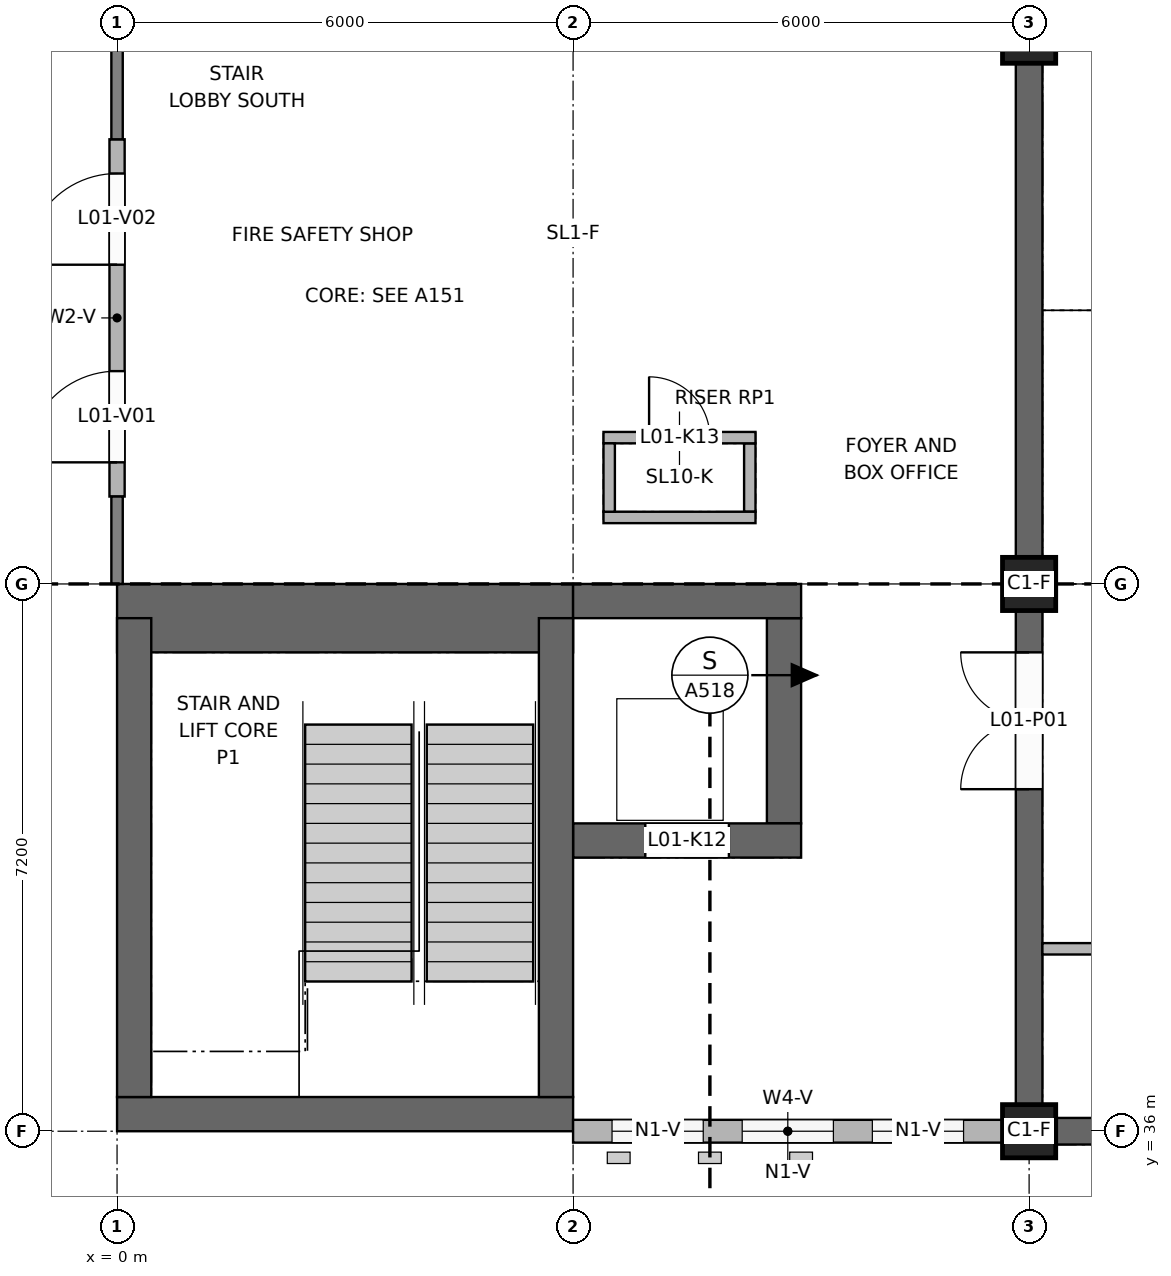
"""IFC4 building model, lengths in metres.
Left out: names, types, materials, properties, quantities, classifications, styles, units other than length and angle.
Written with IfcOpenShell. Run it as: python <this file> out.ifc"""

import sys

from ifc_helpers import new_model, si_unit, direction, frame, frame_2d, origin, origin_2d, place, context, subcontext, project, spatial, rectangle, extrude, element, fill, save


model = new_model("IFC4")
c1 = context("Model", 3, precision=1e-05, world=origin(), true_north=direction((0.0, 1.0)))
c2 = subcontext(c1, "Body", "Model", "MODEL_VIEW")
j1 = project(units=[si_unit("LENGTHUNIT", "METRE"), si_unit("PLANEANGLEUNIT", "RADIAN")], contexts=[c1])
p1 = place(None, origin())
s1 = spatial("IfcSite", under=j1, at=p1, CompositionType="ELEMENT")
p2 = place(p1, origin())
s2 = spatial("IfcBuilding", under=s1, at=p2, CompositionType="ELEMENT")
p3 = place(p2, frame((0.0, 0.0, 4.2)))
s3 = spatial("IfcBuildingStorey", under=s2, at=p3, CompositionType="ELEMENT", Elevation=4.2)
p4 = place(p3, frame((0.0, 36.225, 0.0), z_axis=(0.0, 0.0, 1.0), x_axis=(1.0, 0.0, 0.0)))
e1 = element("IfcWall", 1, at=p4, inside=s3, PredefinedType="SHEAR", context=c2, shape_type="SweptSolid", body=[
    extrude(rectangle(XDim=6.0, YDim=0.45, at=frame_2d((3.0, 0.0))), origin(), (0.0, 0.0, 1.0), 3.95),
])
p5 = place(p3, frame((0.0, 42.975, 0.0), z_axis=(0.0, 0.0, 1.0), x_axis=(1.0, 0.0, 0.0)))
e2 = element("IfcWall", 2, at=p5, inside=s3, PredefinedType="SHEAR", context=c2, shape_type="SweptSolid", body=[
    extrude(rectangle(XDim=6.0, YDim=0.45, at=frame_2d((3.0, 0.0))), origin(), (0.0, 0.0, 1.0), 3.95),
])
p6 = place(p5, frame((2.4, 0.0, 0.0)))
e3 = element("IfcOpeningElement", 3, at=p6, cuts=e2, PredefinedType="OPENING", context=c2, shape_type="SweptSolid", body=[
    extrude(rectangle(XDim=1.2, YDim=2.1, at=frame_2d((0.6, 1.05))), frame((0.0, 0.235, 0.0), z_axis=(0.0, -1.0, 0.0), x_axis=(1.0, 0.0, 0.0)), (0.0, 0.0, 1.0), 0.47),
])
p7 = place(p3, frame((0.225, 36.45, 0.0), z_axis=(0.0, 0.0, 1.0), x_axis=(0.0, 1.0, 0.0)))
e4 = element("IfcWall", 4, at=p7, inside=s3, PredefinedType="SHEAR", context=c2, shape_type="SweptSolid", body=[
    extrude(rectangle(XDim=6.3, YDim=0.45, at=frame_2d((3.15, 0.0))), origin(), (0.0, 0.0, 1.0), 3.95),
])
p8 = place(p7, frame((1.45, 0.0, 0.0)))
e5 = element("IfcOpeningElement", 5, at=p8, cuts=e4, PredefinedType="OPENING", context=c2, shape_type="SweptSolid", body=[
    extrude(rectangle(XDim=1.4, YDim=2.1, at=frame_2d((0.7, 1.05))), frame((0.0, 0.235, 0.0), z_axis=(0.0, -1.0, 0.0), x_axis=(1.0, 0.0, 0.0)), (0.0, 0.0, 1.0), 0.47),
])
p9 = place(p3, frame((5.775, 36.45, 0.0), z_axis=(0.0, 0.0, 1.0), x_axis=(0.0, 1.0, 0.0)))
e6 = element("IfcWall", 6, at=p9, inside=s3, PredefinedType="SHEAR", context=c2, shape_type="SweptSolid", body=[
    extrude(rectangle(XDim=6.3, YDim=0.45, at=frame_2d((3.15, 0.0))), origin(), (0.0, 0.0, 1.0), 3.95),
])
p10 = place(p3, frame((6.0, 39.825, 0.0), z_axis=(0.0, 0.0, 1.0), x_axis=(1.0, 0.0, 0.0)))
e7 = element("IfcWall", 7, at=p10, inside=s3, PredefinedType="SHEAR", context=c2, shape_type="SweptSolid", body=[
    extrude(rectangle(XDim=3.0, YDim=0.45, at=frame_2d((1.5, 0.0))), origin(), (0.0, 0.0, 1.0), 4.2),
])
p11 = place(p10, frame((0.95, 0.0, 0.0)))
e8 = element("IfcOpeningElement", 8, at=p11, cuts=e7, PredefinedType="OPENING", context=c2, shape_type="SweptSolid", body=[
    extrude(rectangle(XDim=1.1, YDim=2.1, at=frame_2d((0.55, 1.05))), frame((0.0, 0.235, 0.0), z_axis=(0.0, -1.0, 0.0), x_axis=(1.0, 0.0, 0.0)), (0.0, 0.0, 1.0), 0.47),
])
p12 = place(p3, frame((6.0, 42.975, 0.0), z_axis=(0.0, 0.0, 1.0), x_axis=(1.0, 0.0, 0.0)))
e9 = element("IfcWall", 9, at=p12, inside=s3, PredefinedType="SHEAR", context=c2, shape_type="SweptSolid", body=[
    extrude(rectangle(XDim=3.0, YDim=0.45, at=frame_2d((1.5, 0.0))), origin(), (0.0, 0.0, 1.0), 4.2),
])
p13 = place(p3, frame((8.775, 40.05, 0.0), z_axis=(0.0, 0.0, 1.0), x_axis=(0.0, 1.0, 0.0)))
e10 = element("IfcWall", 10, at=p13, inside=s3, PredefinedType="SHEAR", context=c2, shape_type="SweptSolid", body=[
    extrude(rectangle(XDim=2.7, YDim=0.45, at=frame_2d((1.35, 0.0))), origin(), (0.0, 0.0, 1.0), 4.2),
])
p14 = place(p3, frame((0.0, 36.225, -0.2), z_axis=(0.0, 0.0, 1.0), x_axis=(1.0, 0.0, 0.0)))
e11 = element("IfcWall", 11, at=p14, inside=s3, PredefinedType="SOLIDWALL", context=c2, shape_type="SweptSolid", body=[
    extrude(rectangle(XDim=6.0, YDim=0.45, at=frame_2d((3.0, 0.0))), origin(), (0.0, 0.0, 1.0), 0.2),
])
p15 = place(p3, frame((0.0, 42.75, -0.2), z_axis=(0.0, 0.0, 1.0), x_axis=(1.0, 0.0, 0.0)))
e12 = element("IfcWall", 12, at=p15, inside=s3, PredefinedType="SOLIDWALL", context=c2, shape_type="SweptSolid", body=[
    extrude(rectangle(XDim=6.0, YDim=0.9, at=frame_2d((3.0, 0.0))), origin(), (0.0, 0.0, 1.0), 0.2),
])
p16 = place(p3, frame((0.225, 36.45, -0.2), z_axis=(0.0, 0.0, 1.0), x_axis=(0.0, 1.0, 0.0)))
e13 = element("IfcWall", 13, at=p16, inside=s3, PredefinedType="SOLIDWALL", context=c2, shape_type="SweptSolid", body=[
    extrude(rectangle(XDim=6.3, YDim=0.45, at=frame_2d((3.15, 0.0))), origin(), (0.0, 0.0, 1.0), 0.2),
])
p17 = place(p3, frame((6.4, 44.075, 0.0), z_axis=(0.0, 0.0, 1.0), x_axis=(1.0, 0.0, 0.0)))
e14 = element("IfcWall", 14, at=p17, inside=s3, PredefinedType="SOLIDWALL", context=c2, shape_type="SweptSolid", body=[
    extrude(rectangle(XDim=2.0, YDim=0.15, at=frame_2d((1.0, 0.0))), origin(), (0.0, 0.0, 1.0), 4.2),
])
p18 = place(p3, frame((6.4, 45.125, 0.0), z_axis=(0.0, 0.0, 1.0), x_axis=(1.0, 0.0, 0.0)))
e15 = element("IfcWall", 15, at=p18, inside=s3, PredefinedType="SOLIDWALL", context=c2, shape_type="SweptSolid", body=[
    extrude(rectangle(XDim=2.0, YDim=0.15, at=frame_2d((1.0, 0.0))), origin(), (0.0, 0.0, 1.0), 4.2),
])
p19 = place(p18, frame((0.6, 0.0, 0.0)))
e16 = element("IfcOpeningElement", 16, at=p19, cuts=e15, PredefinedType="OPENING", context=c2, shape_type="SweptSolid", body=[
    extrude(rectangle(XDim=0.8, YDim=2.1, at=frame_2d((0.4, 1.05))), frame((0.0, 0.085, 0.0), z_axis=(0.0, -1.0, 0.0), x_axis=(1.0, 0.0, 0.0)), (0.0, 0.0, 1.0), 0.17),
])
for number, where, z_axis, x_axis in (
    (17, (6.475, 44.15, 0.0), (0.0, 0.0, 1.0), (0.0, 1.0, 0.0)),
    (18, (8.325, 44.15, 0.0), (0.0, 0.0, 1.0), (0.0, 1.0, 0.0)),
):
    element("IfcWall", number, at=place(p3, frame(where, z_axis=z_axis, x_axis=x_axis)), inside=s3, PredefinedType="SOLIDWALL", context=c2, shape_type="SweptSolid", body=[
        extrude(rectangle(XDim=0.9, YDim=0.15, at=frame_2d((0.45, 0.0))), origin(), (0.0, 0.0, 1.0), 4.2),
    ])
for number, where, z_axis, x_axis in (
    (19, (12.0, 36.0, 0.0), (0.0, 0.0, 1.0), (1.0, 0.0, 0.0)),
    (20, (12.0, 43.2, 0.0), (0.0, 0.0, 1.0), (1.0, 0.0, 0.0)),
    (21, (12.0, 50.4, 0.0), (0.0, 0.0, 1.0), (1.0, 0.0, 0.0)),
):
    element("IfcColumn", number, at=place(p3, frame(where, z_axis=z_axis, x_axis=x_axis)), inside=s3, PredefinedType="COLUMN", context=c2, shape_type="SweptSolid", body=[
        extrude(rectangle(XDim=0.7, YDim=0.7, at=origin_2d()), origin(), (0.0, 0.0, 1.0), 3.95),
    ])
p20 = place(p3, frame((12.0, 36.35, 0.0), z_axis=(0.0, 0.0, 1.0), x_axis=(0.0, 1.0, 0.0)))
e22 = element("IfcWall", 22, at=p20, inside=s3, PredefinedType="SHEAR", context=c2, shape_type="SweptSolid", body=[
    extrude(rectangle(XDim=6.5, YDim=0.35, at=frame_2d((3.25, 0.0))), origin(), (0.0, 0.0, 1.0), 3.05),
])
p21 = place(p20, frame((4.15, 0.0, 0.0)))
e23 = element("IfcOpeningElement", 23, at=p21, cuts=e22, PredefinedType="OPENING", context=c2, shape_type="SweptSolid", body=[
    extrude(rectangle(XDim=1.8, YDim=2.1, at=frame_2d((0.9, 1.05))), frame((0.0, 0.185, 0.0), z_axis=(0.0, -1.0, 0.0), x_axis=(1.0, 0.0, 0.0)), (0.0, 0.0, 1.0), 0.37),
])
p22 = place(p3, frame((12.0, 43.55, 0.0), z_axis=(0.0, 0.0, 1.0), x_axis=(0.0, 1.0, 0.0)))
e24 = element("IfcWall", 24, at=p22, inside=s3, PredefinedType="SHEAR", context=c2, shape_type="SweptSolid", body=[
    extrude(rectangle(XDim=6.5, YDim=0.35, at=frame_2d((3.25, 0.0))), origin(), (0.0, 0.0, 1.0), 3.05),
])
p23 = place(p3, frame((12.35, 36.0, 0.0), z_axis=(0.0, 0.0, 1.0), x_axis=(1.0, 0.0, 0.0)))
e25 = element("IfcWall", 25, at=p23, inside=s3, PredefinedType="SHEAR", context=c2, shape_type="SweptSolid", body=[
    extrude(rectangle(XDim=17.475, YDim=0.35, at=frame_2d((8.737, 0.0))), origin(), (0.0, 0.0, 1.0), 4.2),
])
p24 = place(p23, frame((0.85, 0.0, 1.2)))
e26 = element("IfcOpeningElement", 26, at=p24, cuts=e25, PredefinedType="OPENING", context=c2, shape_type="SweptSolid", body=[
    extrude(rectangle(XDim=0.6, YDim=2.4, at=frame_2d((0.3, 1.2))), frame((0.0, 0.185, 0.0), z_axis=(0.0, -1.0, 0.0), x_axis=(1.0, 0.0, 0.0)), (0.0, 0.0, 1.0), 0.37),
])
p25 = place(p23, frame((3.85, 0.0, 1.2)))
e27 = element("IfcOpeningElement", 27, at=p25, cuts=e25, PredefinedType="OPENING", context=c2, shape_type="SweptSolid", body=[
    extrude(rectangle(XDim=0.6, YDim=2.4, at=frame_2d((0.3, 1.2))), frame((0.0, 0.185, 0.0), z_axis=(0.0, -1.0, 0.0), x_axis=(1.0, 0.0, 0.0)), (0.0, 0.0, 1.0), 0.37),
])
p26 = place(p23, frame((6.85, 0.0, 1.2)))
e28 = element("IfcOpeningElement", 28, at=p26, cuts=e25, PredefinedType="OPENING", context=c2, shape_type="SweptSolid", body=[
    extrude(rectangle(XDim=0.6, YDim=2.4, at=frame_2d((0.3, 1.2))), frame((0.0, 0.185, 0.0), z_axis=(0.0, -1.0, 0.0), x_axis=(1.0, 0.0, 0.0)), (0.0, 0.0, 1.0), 0.37),
])
p27 = place(p23, frame((9.85, 0.0, 1.2)))
e29 = element("IfcOpeningElement", 29, at=p27, cuts=e25, PredefinedType="OPENING", context=c2, shape_type="SweptSolid", body=[
    extrude(rectangle(XDim=0.6, YDim=2.4, at=frame_2d((0.3, 1.2))), frame((0.0, 0.185, 0.0), z_axis=(0.0, -1.0, 0.0), x_axis=(1.0, 0.0, 0.0)), (0.0, 0.0, 1.0), 0.37),
])
p28 = place(p23, frame((12.85, 0.0, 1.2)))
e30 = element("IfcOpeningElement", 30, at=p28, cuts=e25, PredefinedType="OPENING", context=c2, shape_type="SweptSolid", body=[
    extrude(rectangle(XDim=0.6, YDim=2.4, at=frame_2d((0.3, 1.2))), frame((0.0, 0.185, 0.0), z_axis=(0.0, -1.0, 0.0), x_axis=(1.0, 0.0, 0.0)), (0.0, 0.0, 1.0), 0.37),
])
p29 = place(p23, frame((15.85, 0.0, 1.2)))
e31 = element("IfcOpeningElement", 31, at=p29, cuts=e25, PredefinedType="OPENING", context=c2, shape_type="SweptSolid", body=[
    extrude(rectangle(XDim=0.6, YDim=2.4, at=frame_2d((0.3, 1.2))), frame((0.0, 0.185, 0.0), z_axis=(0.0, -1.0, 0.0), x_axis=(1.0, 0.0, 0.0)), (0.0, 0.0, 1.0), 0.37),
])
p30 = place(p3, frame((0.0, 44.35, 0.0), z_axis=(0.0, 0.0, 1.0), x_axis=(0.0, 1.0, 0.0)))
e32 = element("IfcWall", 32, at=p30, inside=s3, PredefinedType="SOLIDWALL", context=c2, shape_type="SweptSolid", body=[
    extrude(rectangle(XDim=4.7, YDim=0.2, at=frame_2d((2.35, 0.0))), origin(), (0.0, 0.0, 1.0), 3.05),
])
p31 = place(p30, frame((0.45, 0.0, 0.0)))
e33 = element("IfcOpeningElement", 33, at=p31, cuts=e32, PredefinedType="OPENING", context=c2, shape_type="SweptSolid", body=[
    extrude(rectangle(XDim=1.2, YDim=2.4, at=frame_2d((0.6, 1.2))), frame((0.0, 0.11, 0.0), z_axis=(0.0, -1.0, 0.0), x_axis=(1.0, 0.0, 0.0)), (0.0, 0.0, 1.0), 0.22),
])
p32 = place(p30, frame((3.05, 0.0, 0.0)))
e34 = element("IfcOpeningElement", 34, at=p32, cuts=e32, PredefinedType="OPENING", context=c2, shape_type="SweptSolid", body=[
    extrude(rectangle(XDim=1.2, YDim=2.4, at=frame_2d((0.6, 1.2))), frame((0.0, 0.11, 0.0), z_axis=(0.0, -1.0, 0.0), x_axis=(1.0, 0.0, 0.0)), (0.0, 0.0, 1.0), 0.22),
])
p33 = place(p3, frame((6.0, 36.0, 0.0), z_axis=(0.0, 0.0, 1.0), x_axis=(1.0, 0.0, 0.0)))
e35 = element("IfcWall", 35, at=p33, inside=s3, PredefinedType="SOLIDWALL", context=c2, shape_type="SweptSolid", body=[
    extrude(rectangle(XDim=5.65, YDim=0.3, at=frame_2d((2.825, 0.0))), origin(), (0.0, 0.0, 1.0), 3.15),
])
p34 = place(p33, frame((0.512, 0.0, 0.9)))
e36 = element("IfcOpeningElement", 36, at=p34, cuts=e35, PredefinedType="OPENING", context=c2, shape_type="SweptSolid", body=[
    extrude(rectangle(XDim=1.2, YDim=1.5, at=frame_2d((0.6, 0.75))), frame((0.0, 0.16, 0.0), z_axis=(0.0, -1.0, 0.0), x_axis=(1.0, 0.0, 0.0)), (0.0, 0.0, 1.0), 0.32),
])
p35 = place(p33, frame((2.225, 0.0, 0.9)))
e37 = element("IfcOpeningElement", 37, at=p35, cuts=e35, PredefinedType="OPENING", context=c2, shape_type="SweptSolid", body=[
    extrude(rectangle(XDim=1.2, YDim=1.5, at=frame_2d((0.6, 0.75))), frame((0.0, 0.16, 0.0), z_axis=(0.0, -1.0, 0.0), x_axis=(1.0, 0.0, 0.0)), (0.0, 0.0, 1.0), 0.32),
])
p36 = place(p33, frame((3.938, 0.0, 0.9)))
e38 = element("IfcOpeningElement", 38, at=p36, cuts=e35, PredefinedType="OPENING", context=c2, shape_type="SweptSolid", body=[
    extrude(rectangle(XDim=1.2, YDim=1.5, at=frame_2d((0.6, 0.75))), frame((0.0, 0.16, 0.0), z_axis=(0.0, -1.0, 0.0), x_axis=(1.0, 0.0, 0.0)), (0.0, 0.0, 1.0), 0.32),
])
p37 = place(p3, frame((12.175, 38.4, 0.0), z_axis=(0.0, 0.0, 1.0), x_axis=(1.0, 0.0, 0.0)))
e39 = element("IfcWall", 39, at=p37, inside=s3, PredefinedType="PARTITIONING", context=c2, shape_type="SweptSolid", body=[
    extrude(rectangle(XDim=17.65, YDim=0.15, at=frame_2d((8.825, 0.0))), origin(), (0.0, 0.0, 1.0), 3.05),
])
p38 = place(p37, frame((8.225, 0.0, 0.0)))
e40 = element("IfcOpeningElement", 40, at=p38, cuts=e39, PredefinedType="OPENING", context=c2, shape_type="SweptSolid", body=[
    extrude(rectangle(XDim=1.2, YDim=2.1, at=frame_2d((0.6, 1.05))), frame((0.0, 0.085, 0.0), z_axis=(0.0, -1.0, 0.0), x_axis=(1.0, 0.0, 0.0)), (0.0, 0.0, 1.0), 0.17),
])
p39 = place(p31, origin())
e41 = element("IfcDoor", 41, at=p39, inside=s3, OperationType="SINGLE_SWING_LEFT", PredefinedType="DOOR", context=c2, shape_type="SweptSolid", body=[
    extrude(rectangle(XDim=1.2, YDim=2.4, at=frame_2d((0.6, 1.2))), frame((0.0, 0.025, 0.0), z_axis=(0.0, -1.0, 0.0), x_axis=(1.0, 0.0, 0.0)), (0.0, 0.0, 1.0), 0.05),
])
fill(e33, e41)
p40 = place(p32, origin())
e42 = element("IfcDoor", 42, at=p40, inside=s3, OperationType="SINGLE_SWING_LEFT", PredefinedType="DOOR", context=c2, shape_type="SweptSolid", body=[
    extrude(rectangle(XDim=1.2, YDim=2.4, at=frame_2d((0.6, 1.2))), frame((0.0, 0.025, 0.0), z_axis=(0.0, -1.0, 0.0), x_axis=(1.0, 0.0, 0.0)), (0.0, 0.0, 1.0), 0.05),
])
fill(e34, e42)
p41 = place(p34, origin())
e43 = element("IfcWindow", 43, at=p41, inside=s3, PartitioningType="SINGLE_PANEL", PredefinedType="WINDOW", context=c2, shape_type="SweptSolid", body=[
    extrude(rectangle(XDim=1.2, YDim=1.5, at=frame_2d((0.6, 0.75))), frame((0.0, 0.03, 0.0), z_axis=(0.0, -1.0, 0.0), x_axis=(1.0, 0.0, 0.0)), (0.0, 0.0, 1.0), 0.06),
])
fill(e36, e43)
p42 = place(p35, origin())
e44 = element("IfcWindow", 44, at=p42, inside=s3, PartitioningType="SINGLE_PANEL", PredefinedType="WINDOW", context=c2, shape_type="SweptSolid", body=[
    extrude(rectangle(XDim=1.2, YDim=1.5, at=frame_2d((0.6, 0.75))), frame((0.0, 0.03, 0.0), z_axis=(0.0, -1.0, 0.0), x_axis=(1.0, 0.0, 0.0)), (0.0, 0.0, 1.0), 0.06),
])
fill(e37, e44)
p43 = place(p36, origin())
e45 = element("IfcWindow", 45, at=p43, inside=s3, PartitioningType="SINGLE_PANEL", PredefinedType="WINDOW", context=c2, shape_type="SweptSolid", body=[
    extrude(rectangle(XDim=1.2, YDim=1.5, at=frame_2d((0.6, 0.75))), frame((0.0, 0.03, 0.0), z_axis=(0.0, -1.0, 0.0), x_axis=(1.0, 0.0, 0.0)), (0.0, 0.0, 1.0), 0.06),
])
fill(e38, e45)
p44 = place(p6, frame((1.2, 0.0, 0.0), z_axis=(0.0, 0.0, 1.0), x_axis=(-1.0, 0.0, 0.0)))
e46 = element("IfcDoor", 46, at=p44, inside=s3, OperationType="SINGLE_SWING_RIGHT", PredefinedType="DOOR", context=c2, shape_type="SweptSolid", body=[
    extrude(rectangle(XDim=1.2, YDim=2.1, at=frame_2d((0.6, 1.05))), frame((0.0, 0.025, 0.0), z_axis=(0.0, -1.0, 0.0), x_axis=(1.0, 0.0, 0.0)), (0.0, 0.0, 1.0), 0.05),
])
fill(e3, e46)
p45 = place(p8, origin())
e47 = element("IfcDoor", 47, at=p45, inside=s3, OperationType="DOUBLE_DOOR_SINGLE_SWING", PredefinedType="DOOR", context=c2, shape_type="SweptSolid", body=[
    extrude(rectangle(XDim=1.4, YDim=2.1, at=frame_2d((0.7, 1.05))), frame((0.0, 0.025, 0.0), z_axis=(0.0, -1.0, 0.0), x_axis=(1.0, 0.0, 0.0)), (0.0, 0.0, 1.0), 0.05),
])
fill(e5, e47)
p46 = place(p11, origin())
e48 = element("IfcDoor", 48, at=p46, inside=s3, OperationType="DOUBLE_DOOR_SLIDING", PredefinedType="DOOR", context=c2, shape_type="SweptSolid", body=[
    extrude(rectangle(XDim=1.1, YDim=2.1, at=frame_2d((0.55, 1.05))), frame((0.0, 0.025, 0.0), z_axis=(0.0, -1.0, 0.0), x_axis=(1.0, 0.0, 0.0)), (0.0, 0.0, 1.0), 0.05),
])
fill(e8, e48)
p47 = place(p19, origin())
e49 = element("IfcDoor", 49, at=p47, inside=s3, OperationType="SINGLE_SWING_LEFT", PredefinedType="DOOR", context=c2, shape_type="SweptSolid", body=[
    extrude(rectangle(XDim=0.8, YDim=2.1, at=frame_2d((0.4, 1.05))), frame((0.0, 0.025, 0.0), z_axis=(0.0, -1.0, 0.0), x_axis=(1.0, 0.0, 0.0)), (0.0, 0.0, 1.0), 0.05),
])
fill(e16, e49)
p48 = place(p21, origin())
e50 = element("IfcDoor", 50, at=p48, inside=s3, OperationType="DOUBLE_DOOR_SINGLE_SWING", PredefinedType="DOOR", context=c2, shape_type="SweptSolid", body=[
    extrude(rectangle(XDim=1.8, YDim=2.1, at=frame_2d((0.9, 1.05))), frame((0.0, 0.025, 0.0), z_axis=(0.0, -1.0, 0.0), x_axis=(1.0, 0.0, 0.0)), (0.0, 0.0, 1.0), 0.05),
])
fill(e23, e50)
save(model, sys.argv[1])
